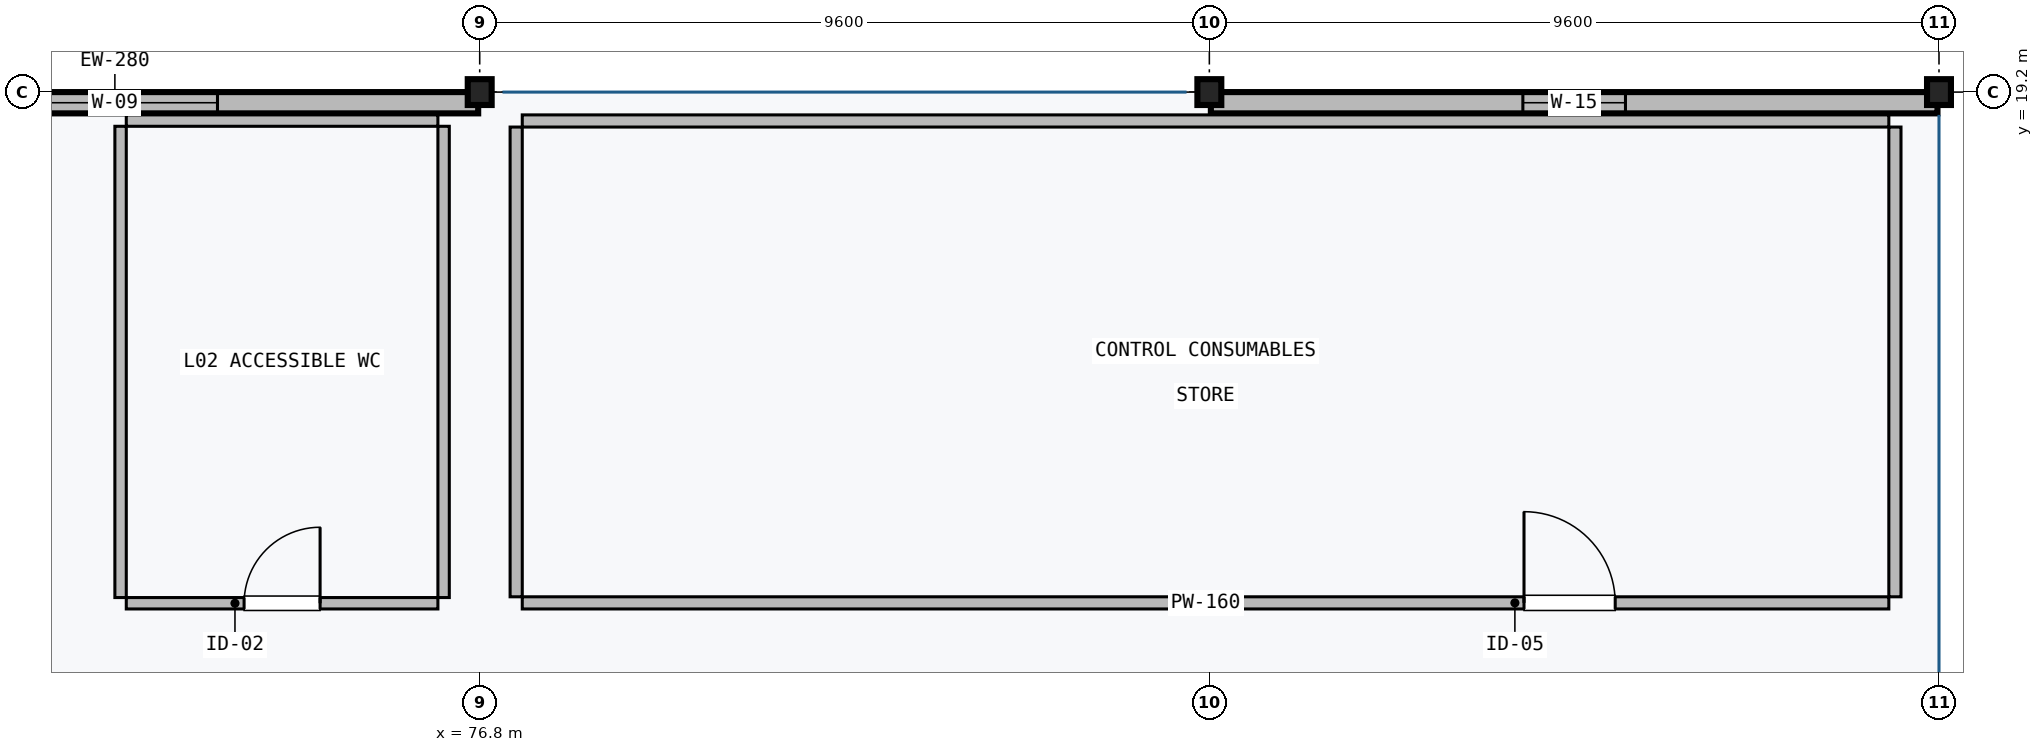
"""IFC4 building model, lengths in metres.
Left out: names, types, materials, properties, quantities, classifications, styles, units other than length and angle.
Written with IfcOpenShell. Run it as: python <this file> out.ifc"""

import sys

from ifc_helpers import new_model, si_unit, direction, frame, frame_2d, origin, origin_2d, place, context, subcontext, project, spatial, rectangle, i_section, extrude, element, fill, save


model = new_model("IFC4")
c1 = context("Model", 3, precision=1e-05, world=origin(), true_north=direction((0.0, 1.0)))
c2 = subcontext(c1, "Body", "Model", "MODEL_VIEW")
j1 = project(units=[si_unit("LENGTHUNIT", "METRE"), si_unit("PLANEANGLEUNIT", "RADIAN")], contexts=[c1])
p1 = place(None, origin())
s1 = spatial("IfcSite", under=j1, at=p1, CompositionType="ELEMENT")
p2 = place(p1, origin())
s2 = spatial("IfcBuilding", under=s1, at=p2, CompositionType="ELEMENT")
p3 = place(p2, frame((0.0, 0.0, 10.5)))
s3 = spatial("IfcBuildingStorey", under=s2, at=p3, CompositionType="ELEMENT", Elevation=10.5)
for number, where, z_axis, x_axis in (
    (1, (76.8, 19.2, 0.0), (0.0, 0.0, 1.0), (1.0, 0.0, 0.0)),
    (2, (86.4, 19.2, 0.0), (0.0, 0.0, 1.0), (1.0, 0.0, 0.0)),
    (3, (96.0, 19.2, 0.0), (0.0, 0.0, 1.0), (1.0, 0.0, 0.0)),
):
    element("IfcColumn", number, at=place(p3, frame(where, z_axis=z_axis, x_axis=x_axis)), inside=s3, PredefinedType="COLUMN", context=c2, shape_type="SweptSolid", body=[
        extrude(i_section(OverallWidth=0.314, OverallDepth=0.34, WebThickness=0.019, FlangeThickness=0.031, FilletRadius=0.015, at=origin_2d()), origin(), (0.0, 0.0, 1.0), 3.95),
    ])
p4 = place(p3, frame((67.22, 19.06, 0.0), z_axis=(0.0, 0.0, 1.0), x_axis=(1.0, 0.0, 0.0)))
e4 = element("IfcWall", 4, at=p4, inside=s3, PredefinedType="SOLIDWALL", context=c2, shape_type="SweptSolid", body=[
    extrude(rectangle(XDim=9.56, YDim=0.28, at=frame_2d((4.78, 0.0))), origin(), (0.0, 0.0, 1.0), 3.66),
])
p5 = place(p4, frame((3.43, 0.0, 0.9)))
e5 = element("IfcOpeningElement", 5, at=p5, cuts=e4, PredefinedType="OPENING", context=c2, shape_type="SweptSolid", body=[
    extrude(rectangle(XDim=2.7, YDim=1.5, at=frame_2d((1.35, 0.75))), frame((0.0, 0.15, 0.0), z_axis=(0.0, -1.0, 0.0), x_axis=(1.0, 0.0, 0.0)), (0.0, 0.0, 1.0), 0.3),
])
p6 = place(p3, frame((86.42, 19.06, 0.0), z_axis=(0.0, 0.0, 1.0), x_axis=(1.0, 0.0, 0.0)))
e6 = element("IfcWall", 6, at=p6, inside=s3, PredefinedType="SOLIDWALL", context=c2, shape_type="SweptSolid", body=[
    extrude(rectangle(XDim=9.56, YDim=0.28, at=frame_2d((4.78, 0.0))), origin(), (0.0, 0.0, 1.0), 3.66),
])
p7 = place(p6, frame((4.105, 0.0, 0.9)))
e7 = element("IfcOpeningElement", 7, at=p7, cuts=e6, PredefinedType="OPENING", context=c2, shape_type="SweptSolid", body=[
    extrude(rectangle(XDim=1.35, YDim=1.5, at=frame_2d((0.675, 0.75))), frame((0.0, 0.15, 0.0), z_axis=(0.0, -1.0, 0.0), x_axis=(1.0, 0.0, 0.0)), (0.0, 0.0, 1.0), 0.3),
])
p8 = place(p3, frame((76.25, 12.475, 0.0), z_axis=(0.0, 0.0, 1.0), x_axis=(-1.0, 0.0, 0.0)))
e8 = element("IfcWall", 8, at=p8, inside=s3, PredefinedType="PLUMBINGWALL", context=c2, shape_type="SweptSolid", body=[
    extrude(rectangle(XDim=4.1, YDim=0.15, at=frame_2d((2.05, 0.0))), origin(), (0.0, 0.0, 1.0), 3.59),
])
p9 = place(p8, frame((1.55, 0.0, 0.0)))
e9 = element("IfcOpeningElement", 9, at=p9, cuts=e8, PredefinedType="OPENING", context=c2, shape_type="SweptSolid", body=[
    extrude(rectangle(XDim=1.0, YDim=2.15, at=frame_2d((0.5, 1.075))), frame((0.0, 0.085, 0.0), z_axis=(0.0, -1.0, 0.0), x_axis=(1.0, 0.0, 0.0)), (0.0, 0.0, 1.0), 0.17),
])
p10 = place(p3, frame((72.15, 18.825, 0.0), z_axis=(0.0, 0.0, 1.0), x_axis=(1.0, 0.0, 0.0)))
e10 = element("IfcWall", 10, at=p10, inside=s3, PredefinedType="PLUMBINGWALL", context=c2, shape_type="SweptSolid", body=[
    extrude(rectangle(XDim=4.1, YDim=0.15, at=frame_2d((2.05, 0.0))), origin(), (0.0, 0.0, 1.0), 3.59),
])
for number, where, z_axis, x_axis in (
    (11, (72.075, 12.55, 0.0), (0.0, 0.0, 1.0), (0.0, 1.0, 0.0)),
    (12, (76.325, 18.75, 0.0), (0.0, 0.0, 1.0), (0.0, -1.0, 0.0)),
):
    element("IfcWall", number, at=place(p3, frame(where, z_axis=z_axis, x_axis=x_axis)), inside=s3, PredefinedType="PLUMBINGWALL", context=c2, shape_type="SweptSolid", body=[
        extrude(rectangle(XDim=6.2, YDim=0.15, at=frame_2d((3.1, 0.0))), origin(), (0.0, 0.0, 1.0), 3.59),
    ])
p11 = place(p3, frame((95.34, 12.48, 0.0), z_axis=(0.0, 0.0, 1.0), x_axis=(-1.0, 0.0, 0.0)))
e13 = element("IfcWall", 13, at=p11, inside=s3, PredefinedType="PARTITIONING", context=c2, shape_type="SweptSolid", body=[
    extrude(rectangle(XDim=17.98, YDim=0.16, at=frame_2d((8.99, 0.0))), origin(), (0.0, 0.0, 1.0), 3.483),
])
p12 = place(p11, frame((3.6, 0.0, 0.0)))
e14 = element("IfcOpeningElement", 14, at=p12, cuts=e13, PredefinedType="OPENING", context=c2, shape_type="SweptSolid", body=[
    extrude(rectangle(XDim=1.2, YDim=2.2, at=frame_2d((0.6, 1.1))), frame((0.0, 0.09, 0.0), z_axis=(0.0, -1.0, 0.0), x_axis=(1.0, 0.0, 0.0)), (0.0, 0.0, 1.0), 0.18),
])
p13 = place(p3, frame((77.36, 18.82, 0.0), z_axis=(0.0, 0.0, 1.0), x_axis=(1.0, 0.0, 0.0)))
e15 = element("IfcWall", 15, at=p13, inside=s3, PredefinedType="PARTITIONING", context=c2, shape_type="SweptSolid", body=[
    extrude(rectangle(XDim=17.98, YDim=0.16, at=frame_2d((8.99, 0.0))), origin(), (0.0, 0.0, 1.0), 3.483),
])
for number, where, z_axis, x_axis in (
    (16, (77.28, 12.56, 0.0), (0.0, 0.0, 1.0), (0.0, 1.0, 0.0)),
    (17, (95.42, 18.74, 0.0), (0.0, 0.0, 1.0), (0.0, -1.0, 0.0)),
):
    element("IfcWall", number, at=place(p3, frame(where, z_axis=z_axis, x_axis=x_axis)), inside=s3, PredefinedType="PARTITIONING", context=c2, shape_type="SweptSolid", body=[
        extrude(rectangle(XDim=6.18, YDim=0.16, at=frame_2d((3.09, 0.0))), origin(), (0.0, 0.0, 1.0), 3.59),
    ])
p14 = place(p5, origin())
e18 = element("IfcWindow", 18, at=p14, inside=s3, PartitioningType="SINGLE_PANEL", PredefinedType="WINDOW", context=c2, shape_type="SweptSolid", body=[
    extrude(rectangle(XDim=2.7, YDim=1.5, at=frame_2d((1.35, 0.75))), frame((0.0, 0.03, 0.0), z_axis=(0.0, -1.0, 0.0), x_axis=(1.0, 0.0, 0.0)), (0.0, 0.0, 1.0), 0.06),
])
fill(e5, e18)
p15 = place(p7, origin())
e19 = element("IfcWindow", 19, at=p15, inside=s3, PartitioningType="SINGLE_PANEL", PredefinedType="WINDOW", context=c2, shape_type="SweptSolid", body=[
    extrude(rectangle(XDim=1.35, YDim=1.5, at=frame_2d((0.675, 0.75))), frame((0.0, 0.03, 0.0), z_axis=(0.0, -1.0, 0.0), x_axis=(1.0, 0.0, 0.0)), (0.0, 0.0, 1.0), 0.06),
])
fill(e7, e19)
p16 = place(p9, frame((1.0, 0.0, 0.0), z_axis=(0.0, 0.0, 1.0), x_axis=(-1.0, 0.0, 0.0)))
e20 = element("IfcDoor", 20, at=p16, inside=s3, OperationType="SINGLE_SWING_LEFT", PredefinedType="DOOR", context=c2, shape_type="SweptSolid", body=[
    extrude(rectangle(XDim=1.0, YDim=2.15, at=frame_2d((0.5, 1.075))), frame((0.0, 0.025, 0.0), z_axis=(0.0, -1.0, 0.0), x_axis=(1.0, 0.0, 0.0)), (0.0, 0.0, 1.0), 0.05),
])
fill(e9, e20)
p17 = place(p12, frame((1.2, 0.0, 0.0), z_axis=(0.0, 0.0, 1.0), x_axis=(-1.0, 0.0, 0.0)))
e21 = element("IfcDoor", 21, at=p17, inside=s3, OperationType="SINGLE_SWING_RIGHT", PredefinedType="DOOR", context=c2, shape_type="SweptSolid", body=[
    extrude(rectangle(XDim=1.2, YDim=2.2, at=frame_2d((0.6, 1.1))), frame((0.0, 0.025, 0.0), z_axis=(0.0, -1.0, 0.0), x_axis=(1.0, 0.0, 0.0)), (0.0, 0.0, 1.0), 0.05),
])
fill(e14, e21)
save(model, sys.argv[1])
